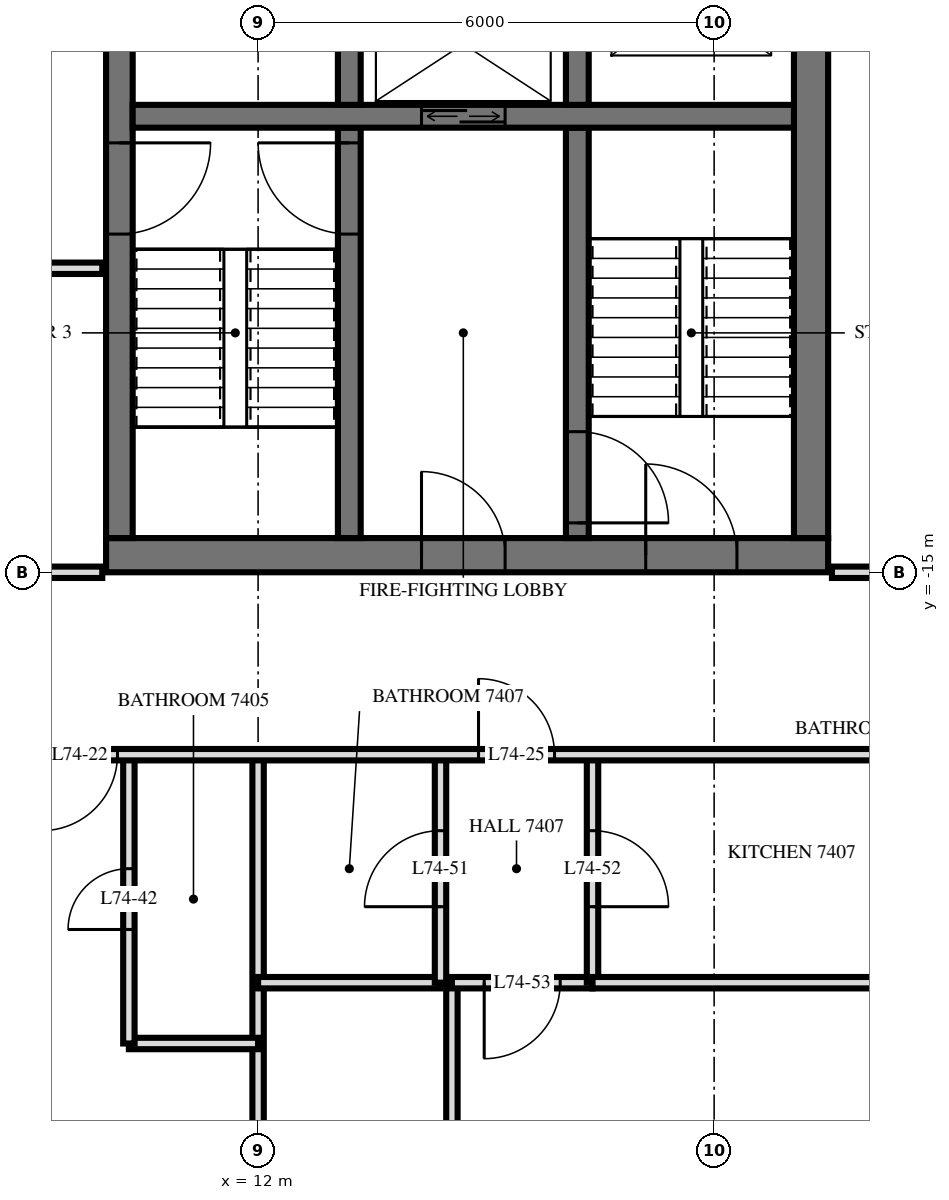
"""IFC4 building model, lengths in metres.
Left out: names, types, materials, properties, quantities, classifications, styles, units other than length and angle.
Written with IfcOpenShell. Run it as: python <this file> out.ifc"""

import sys

from ifc_helpers import new_model, si_unit, direction, frame, frame_2d, origin, place, context, subcontext, project, spatial, rectangle, extrude, element, fill, save


model = new_model("IFC4")
c1 = context("Model", 3, precision=1e-05, world=origin(), true_north=direction((0.0, 1.0)))
c2 = subcontext(c1, "Body", "Model", "MODEL_VIEW")
j1 = project(units=[si_unit("LENGTHUNIT", "METRE"), si_unit("PLANEANGLEUNIT", "RADIAN")], contexts=[c1])
p1 = place(None, origin())
s1 = spatial("IfcSite", under=j1, at=p1, CompositionType="ELEMENT")
p2 = place(p1, origin())
s2 = spatial("IfcBuilding", under=s1, at=p2, CompositionType="ELEMENT")
p3 = place(p2, frame((0.0, 0.0, 280.6)))
s3 = spatial("IfcBuildingStorey", under=s2, at=p3, CompositionType="ELEMENT", Elevation=280.6)
p4 = place(p3, frame((10.0, -14.775, 0.0), z_axis=(0.0, 0.0, 1.0), x_axis=(1.0, 0.0, 0.0)))
e1 = element("IfcWall", 1, at=p4, inside=s3, PredefinedType="SHEAR", context=c2, shape_type="SweptSolid", body=[
    extrude(rectangle(XDim=9.5, YDim=0.45, at=frame_2d((4.75, 0.0))), origin(), (0.0, 0.0, 1.0), 3.5),
])
p5 = place(p4, frame((7.1, 0.0, 0.0)))
e2 = element("IfcOpeningElement", 2, at=p5, cuts=e1, PredefinedType="OPENING", context=c2, shape_type="SweptSolid", body=[
    extrude(rectangle(XDim=1.2, YDim=2.1, at=frame_2d((0.6, 1.05))), frame((0.0, 0.235, 0.0), z_axis=(0.0, -1.0, 0.0), x_axis=(1.0, 0.0, 0.0)), (0.0, 0.0, 1.0), 0.47),
])
p6 = place(p4, frame((4.15, 0.0, 0.0)))
e3 = element("IfcOpeningElement", 3, at=p6, cuts=e1, PredefinedType="OPENING", context=c2, shape_type="SweptSolid", body=[
    extrude(rectangle(XDim=1.1, YDim=2.1, at=frame_2d((0.55, 1.05))), frame((0.0, 0.235, 0.0), z_axis=(0.0, -1.0, 0.0), x_axis=(1.0, 0.0, 0.0)), (0.0, 0.0, 1.0), 0.47),
])
p7 = place(p3, frame((10.175, -14.55, 0.0), z_axis=(0.0, 0.0, 1.0), x_axis=(0.0, 1.0, 0.0)))
e4 = element("IfcWall", 4, at=p7, inside=s3, PredefinedType="SHEAR", context=c2, shape_type="SweptSolid", body=[
    extrude(rectangle(XDim=14.1, YDim=0.35, at=frame_2d((7.05, 0.0))), origin(), (0.0, 0.0, 1.0), 3.5),
])
p8 = place(p7, frame((8.4, 0.0, 0.0)))
e5 = element("IfcOpeningElement", 5, at=p8, cuts=e4, PredefinedType="OPENING", context=c2, shape_type="SweptSolid", body=[
    extrude(rectangle(XDim=1.4, YDim=2.4, at=frame_2d((0.7, 1.2))), frame((0.0, 0.185, 0.0), z_axis=(0.0, -1.0, 0.0), x_axis=(1.0, 0.0, 0.0)), (0.0, 0.0, 1.0), 0.37),
])
p9 = place(p7, frame((10.0, 0.0, 0.0)))
e6 = element("IfcOpeningElement", 6, at=p9, cuts=e4, PredefinedType="OPENING", context=c2, shape_type="SweptSolid", body=[
    extrude(rectangle(XDim=1.4, YDim=2.4, at=frame_2d((0.7, 1.2))), frame((0.0, 0.185, 0.0), z_axis=(0.0, -1.0, 0.0), x_axis=(1.0, 0.0, 0.0)), (0.0, 0.0, 1.0), 0.37),
])
p10 = place(p7, frame((4.0, 0.0, 0.0)))
e7 = element("IfcOpeningElement", 7, at=p10, cuts=e4, PredefinedType="OPENING", context=c2, shape_type="SweptSolid", body=[
    extrude(rectangle(XDim=1.2, YDim=2.1, at=frame_2d((0.6, 1.05))), frame((0.0, 0.185, 0.0), z_axis=(0.0, -1.0, 0.0), x_axis=(1.0, 0.0, 0.0)), (0.0, 0.0, 1.0), 0.37),
])
p11 = place(p3, frame((19.275, -14.55, 0.0), z_axis=(0.0, 0.0, 1.0), x_axis=(0.0, 1.0, 0.0)))
e8 = element("IfcWall", 8, at=p11, inside=s3, PredefinedType="SHEAR", context=c2, shape_type="SweptSolid", body=[
    extrude(rectangle(XDim=14.1, YDim=0.45, at=frame_2d((7.05, 0.0))), origin(), (0.0, 0.0, 1.0), 3.5),
])
p12 = place(p3, frame((10.35, -9.0, 0.0), z_axis=(0.0, 0.0, 1.0), x_axis=(1.0, 0.0, 0.0)))
e9 = element("IfcWall", 9, at=p12, inside=s3, PredefinedType="SHEAR", context=c2, shape_type="SweptSolid", body=[
    extrude(rectangle(XDim=8.7, YDim=0.3, at=frame_2d((4.35, 0.0))), origin(), (0.0, 0.0, 1.0), 3.5),
])
p13 = place(p12, frame((3.8, 0.0, 0.0)))
e10 = element("IfcOpeningElement", 10, at=p13, cuts=e9, PredefinedType="OPENING", context=c2, shape_type="SweptSolid", body=[
    extrude(rectangle(XDim=1.1, YDim=2.1, at=frame_2d((0.55, 1.05))), frame((0.0, 0.16, 0.0), z_axis=(0.0, -1.0, 0.0), x_axis=(1.0, 0.0, 0.0)), (0.0, 0.0, 1.0), 0.32),
])
p14 = place(p3, frame((13.2, -8.85, 0.0), z_axis=(0.0, 0.0, 1.0), x_axis=(0.0, 1.0, 0.0)))
e11 = element("IfcWall", 11, at=p14, inside=s3, PredefinedType="SHEAR", context=c2, shape_type="SweptSolid", body=[
    extrude(rectangle(XDim=2.3, YDim=0.3, at=frame_2d((1.15, 0.0))), origin(), (0.0, 0.0, 1.0), 3.5),
])
p15 = place(p3, frame((13.2, -14.55, 0.0), z_axis=(0.0, 0.0, 1.0), x_axis=(0.0, 1.0, 0.0)))
e12 = element("IfcWall", 12, at=p15, inside=s3, PredefinedType="SHEAR", context=c2, shape_type="SweptSolid", body=[
    extrude(rectangle(XDim=5.4, YDim=0.3, at=frame_2d((2.7, 0.0))), origin(), (0.0, 0.0, 1.0), 3.5),
])
p16 = place(p15, frame((4.0, 0.0, 0.0)))
e13 = element("IfcOpeningElement", 13, at=p16, cuts=e12, PredefinedType="OPENING", context=c2, shape_type="SweptSolid", body=[
    extrude(rectangle(XDim=1.2, YDim=2.1, at=frame_2d((0.6, 1.05))), frame((0.0, 0.16, 0.0), z_axis=(0.0, -1.0, 0.0), x_axis=(1.0, 0.0, 0.0)), (0.0, 0.0, 1.0), 0.32),
])
p17 = place(p3, frame((16.2, -8.85, 0.0), z_axis=(0.0, 0.0, 1.0), x_axis=(0.0, 1.0, 0.0)))
e14 = element("IfcWall", 14, at=p17, inside=s3, PredefinedType="SHEAR", context=c2, shape_type="SweptSolid", body=[
    extrude(rectangle(XDim=2.3, YDim=0.3, at=frame_2d((1.15, 0.0))), origin(), (0.0, 0.0, 1.0), 3.5),
])
p18 = place(p3, frame((16.2, -14.55, 0.0), z_axis=(0.0, 0.0, 1.0), x_axis=(0.0, 1.0, 0.0)))
e15 = element("IfcWall", 15, at=p18, inside=s3, PredefinedType="SHEAR", context=c2, shape_type="SweptSolid", body=[
    extrude(rectangle(XDim=5.4, YDim=0.3, at=frame_2d((2.7, 0.0))), origin(), (0.0, 0.0, 1.0), 3.5),
])
p19 = place(p18, frame((0.2, 0.0, 0.0)))
e16 = element("IfcOpeningElement", 16, at=p19, cuts=e15, PredefinedType="OPENING", context=c2, shape_type="SweptSolid", body=[
    extrude(rectangle(XDim=1.2, YDim=2.1, at=frame_2d((0.6, 1.05))), frame((0.0, 0.16, 0.0), z_axis=(0.0, -1.0, 0.0), x_axis=(1.0, 0.0, 0.0)), (0.0, 0.0, 1.0), 0.32),
])
p20 = place(p3, frame((16.4, -20.4, 0.0), z_axis=(0.0, 0.0, 1.0), x_axis=(0.0, 1.0, 0.0)))
e17 = element("IfcWall", 17, at=p20, inside=s3, PredefinedType="PARTITIONING", context=c2, shape_type="SweptSolid", body=[
    extrude(rectangle(XDim=3.0, YDim=0.15, at=frame_2d((1.5, 0.0))), origin(), (0.0, 0.0, 1.0), 3.22),
])
p21 = place(p20, frame((1.0, 0.0, 0.0)))
e18 = element("IfcOpeningElement", 18, at=p21, cuts=e17, PredefinedType="OPENING", context=c2, shape_type="SweptSolid", body=[
    extrude(rectangle(XDim=1.0, YDim=2.1, at=frame_2d((0.5, 1.05))), frame((0.0, 0.085, 0.0), z_axis=(0.0, -1.0, 0.0), x_axis=(1.0, 0.0, 0.0)), (0.0, 0.0, 1.0), 0.17),
])
p22 = place(p3, frame((14.55, -33.62, 0.0), z_axis=(0.0, 0.0, 1.0), x_axis=(0.0, 1.0, 0.0)))
e19 = element("IfcWall", 19, at=p22, inside=s3, PredefinedType="PARTITIONING", context=c2, shape_type="SweptSolid", body=[
    extrude(rectangle(XDim=13.22, YDim=0.15, at=frame_2d((6.61, 0.0))), origin(), (0.0, 0.0, 1.0), 3.22),
])
p23 = place(p22, frame((6.07, 0.0, 0.0)))
e20 = element("IfcOpeningElement", 20, at=p23, cuts=e19, PredefinedType="OPENING", context=c2, shape_type="SweptSolid", body=[
    extrude(rectangle(XDim=0.9, YDim=2.1, at=frame_2d((0.45, 1.05))), frame((0.0, 0.085, 0.0), z_axis=(0.0, -1.0, 0.0), x_axis=(1.0, 0.0, 0.0)), (0.0, 0.0, 1.0), 0.17),
])
p24 = place(p3, frame((14.4, -20.4, 0.0), z_axis=(0.0, 0.0, 1.0), x_axis=(0.0, 1.0, 0.0)))
e21 = element("IfcWall", 21, at=p24, inside=s3, PredefinedType="PARTITIONING", context=c2, shape_type="SweptSolid", body=[
    extrude(rectangle(XDim=3.0, YDim=0.15, at=frame_2d((1.5, 0.0))), origin(), (0.0, 0.0, 1.0), 3.22),
])
p25 = place(p24, frame((1.0, 0.0, 0.0)))
e22 = element("IfcOpeningElement", 22, at=p25, cuts=e21, PredefinedType="OPENING", context=c2, shape_type="SweptSolid", body=[
    extrude(rectangle(XDim=1.0, YDim=2.1, at=frame_2d((0.5, 1.05))), frame((0.0, 0.085, 0.0), z_axis=(0.0, -1.0, 0.0), x_axis=(1.0, 0.0, 0.0)), (0.0, 0.0, 1.0), 0.17),
])
p26 = place(p3, frame((12.0, -33.62, 0.0), z_axis=(0.0, 0.0, 1.0), x_axis=(0.0, 1.0, 0.0)))
e23 = element("IfcWall", 23, at=p26, inside=s3, PredefinedType="PARTITIONING", context=c2, shape_type="SweptSolid", body=[
    extrude(rectangle(XDim=16.22, YDim=0.15, at=frame_2d((8.11, 0.0))), origin(), (0.0, 0.0, 1.0), 3.22),
])
p27 = place(p3, frame((10.3, -21.2, 0.0), z_axis=(0.0, 0.0, 1.0), x_axis=(0.0, 1.0, 0.0)))
e24 = element("IfcWall", 24, at=p27, inside=s3, PredefinedType="PARTITIONING", context=c2, shape_type="SweptSolid", body=[
    extrude(rectangle(XDim=3.8, YDim=0.15, at=frame_2d((1.9, 0.0))), origin(), (0.0, 0.0, 1.0), 3.22),
])
p28 = place(p27, frame((1.5, 0.0, 0.0)))
e25 = element("IfcOpeningElement", 25, at=p28, cuts=e24, PredefinedType="OPENING", context=c2, shape_type="SweptSolid", body=[
    extrude(rectangle(XDim=0.8, YDim=2.1, at=frame_2d((0.4, 1.05))), frame((0.0, 0.085, 0.0), z_axis=(0.0, -1.0, 0.0), x_axis=(1.0, 0.0, 0.0)), (0.0, 0.0, 1.0), 0.17),
])
p29 = place(p3, frame((10.3, -21.2, 0.0), z_axis=(0.0, 0.0, 1.0), x_axis=(1.0, 0.0, 0.0)))
e26 = element("IfcWall", 26, at=p29, inside=s3, PredefinedType="PARTITIONING", context=c2, shape_type="SweptSolid", body=[
    extrude(rectangle(XDim=1.7, YDim=0.15, at=frame_2d((0.85, 0.0))), origin(), (0.0, 0.0, 1.0), 3.22),
])
p30 = place(p3, frame((14.55, -20.4, 0.0), z_axis=(0.0, 0.0, 1.0), x_axis=(1.0, 0.0, 0.0)))
e27 = element("IfcWall", 27, at=p30, inside=s3, PredefinedType="PARTITIONING", context=c2, shape_type="SweptSolid", body=[
    extrude(rectangle(XDim=1.85, YDim=0.15, at=frame_2d((0.925, 0.0))), origin(), (0.0, 0.0, 1.0), 3.22),
])
p31 = place(p30, frame((0.425, 0.0, 0.0)))
e28 = element("IfcOpeningElement", 28, at=p31, cuts=e27, PredefinedType="OPENING", context=c2, shape_type="SweptSolid", body=[
    extrude(rectangle(XDim=1.0, YDim=2.1, at=frame_2d((0.5, 1.05))), frame((0.0, 0.085, 0.0), z_axis=(0.0, -1.0, 0.0), x_axis=(1.0, 0.0, 0.0)), (0.0, 0.0, 1.0), 0.17),
])
p32 = place(p3, frame((12.0, -20.4, 0.0), z_axis=(0.0, 0.0, 1.0), x_axis=(1.0, 0.0, 0.0)))
e29 = element("IfcWall", 29, at=p32, inside=s3, PredefinedType="PARTITIONING", context=c2, shape_type="SweptSolid", body=[
    extrude(rectangle(XDim=2.4, YDim=0.15, at=frame_2d((1.2, 0.0))), origin(), (0.0, 0.0, 1.0), 3.22),
])
p33 = place(p3, frame((16.4, -20.4, 0.0), z_axis=(0.0, 0.0, 1.0), x_axis=(1.0, 0.0, 0.0)))
e30 = element("IfcWall", 30, at=p33, inside=s3, PredefinedType="PARTITIONING", context=c2, shape_type="SweptSolid", body=[
    extrude(rectangle(XDim=4.15, YDim=0.15, at=frame_2d((2.075, 0.0))), origin(), (0.0, 0.0, 1.0), 3.22),
])
p34 = place(p3, frame((-22.92, -17.4, 0.0), z_axis=(0.0, 0.0, 1.0), x_axis=(1.0, 0.0, 0.0)))
e31 = element("IfcWall", 31, at=p34, inside=s3, PredefinedType="PARTITIONING", context=c2, shape_type="SweptSolid", body=[
    extrude(rectangle(XDim=45.84, YDim=0.15, at=frame_2d((22.92, 0.0))), origin(), (0.0, 0.0, 1.0), 3.22),
])
p35 = place(p34, frame((21.67, 0.0, 0.0)))
e32 = element("IfcOpeningElement", 32, at=p35, cuts=e31, PredefinedType="OPENING", context=c2, shape_type="SweptSolid", body=[
    extrude(rectangle(XDim=1.0, YDim=2.1, at=frame_2d((0.5, 1.05))), frame((0.0, 0.085, 0.0), z_axis=(0.0, -1.0, 0.0), x_axis=(1.0, 0.0, 0.0)), (0.0, 0.0, 1.0), 0.17),
])
p36 = place(p34, frame((24.77, 0.0, 0.0)))
e33 = element("IfcOpeningElement", 33, at=p36, cuts=e31, PredefinedType="OPENING", context=c2, shape_type="SweptSolid", body=[
    extrude(rectangle(XDim=1.0, YDim=2.1, at=frame_2d((0.5, 1.05))), frame((0.0, 0.085, 0.0), z_axis=(0.0, -1.0, 0.0), x_axis=(1.0, 0.0, 0.0)), (0.0, 0.0, 1.0), 0.17),
])
p37 = place(p34, frame((26.07, 0.0, 0.0)))
e34 = element("IfcOpeningElement", 34, at=p37, cuts=e31, PredefinedType="OPENING", context=c2, shape_type="SweptSolid", body=[
    extrude(rectangle(XDim=1.0, YDim=2.1, at=frame_2d((0.5, 1.05))), frame((0.0, 0.085, 0.0), z_axis=(0.0, -1.0, 0.0), x_axis=(1.0, 0.0, 0.0)), (0.0, 0.0, 1.0), 0.17),
])
p38 = place(p34, frame((30.77, 0.0, 0.0)))
e35 = element("IfcOpeningElement", 35, at=p38, cuts=e31, PredefinedType="OPENING", context=c2, shape_type="SweptSolid", body=[
    extrude(rectangle(XDim=1.0, YDim=2.1, at=frame_2d((0.5, 1.05))), frame((0.0, 0.085, 0.0), z_axis=(0.0, -1.0, 0.0), x_axis=(1.0, 0.0, 0.0)), (0.0, 0.0, 1.0), 0.17),
])
p39 = place(p34, frame((32.07, 0.0, 0.0)))
e36 = element("IfcOpeningElement", 36, at=p39, cuts=e31, PredefinedType="OPENING", context=c2, shape_type="SweptSolid", body=[
    extrude(rectangle(XDim=1.0, YDim=2.1, at=frame_2d((0.5, 1.05))), frame((0.0, 0.085, 0.0), z_axis=(0.0, -1.0, 0.0), x_axis=(1.0, 0.0, 0.0)), (0.0, 0.0, 1.0), 0.17),
])
p40 = place(p34, frame((9.42, 0.0, 0.0)))
e37 = element("IfcOpeningElement", 37, at=p40, cuts=e31, PredefinedType="OPENING", context=c2, shape_type="SweptSolid", body=[
    extrude(rectangle(XDim=1.0, YDim=2.1, at=frame_2d((0.5, 1.05))), frame((0.0, 0.085, 0.0), z_axis=(0.0, -1.0, 0.0), x_axis=(1.0, 0.0, 0.0)), (0.0, 0.0, 1.0), 0.17),
])
p41 = place(p34, frame((2.67, 0.0, 0.0)))
e38 = element("IfcOpeningElement", 38, at=p41, cuts=e31, PredefinedType="OPENING", context=c2, shape_type="SweptSolid", body=[
    extrude(rectangle(XDim=1.0, YDim=2.1, at=frame_2d((0.5, 1.05))), frame((0.0, 0.085, 0.0), z_axis=(0.0, -1.0, 0.0), x_axis=(1.0, 0.0, 0.0)), (0.0, 0.0, 1.0), 0.17),
])
p42 = place(p34, frame((37.82, 0.0, 0.0)))
e39 = element("IfcOpeningElement", 39, at=p42, cuts=e31, PredefinedType="OPENING", context=c2, shape_type="SweptSolid", body=[
    extrude(rectangle(XDim=1.0, YDim=2.1, at=frame_2d((0.5, 1.05))), frame((0.0, 0.085, 0.0), z_axis=(0.0, -1.0, 0.0), x_axis=(1.0, 0.0, 0.0)), (0.0, 0.0, 1.0), 0.17),
])
p43 = place(p3, frame((-9.95, -15.0, 0.0), z_axis=(0.0, 0.0, 1.0), x_axis=(1.0, 0.0, 0.0)))
e40 = element("IfcWall", 40, at=p43, inside=s3, PredefinedType="PARTITIONING", context=c2, shape_type="SweptSolid", body=[
    extrude(rectangle(XDim=19.9, YDim=0.15, at=frame_2d((9.95, 0.0))), origin(), (0.0, 0.0, 1.0), 2.584),
])
p44 = place(p43, frame((9.45, 0.0, 0.0)))
e41 = element("IfcOpeningElement", 41, at=p44, cuts=e40, PredefinedType="OPENING", context=c2, shape_type="SweptSolid", body=[
    extrude(rectangle(XDim=1.0, YDim=2.1, at=frame_2d((0.5, 1.05))), frame((0.0, 0.085, 0.0), z_axis=(0.0, -1.0, 0.0), x_axis=(1.0, 0.0, 0.0)), (0.0, 0.0, 1.0), 0.17),
])
p45 = place(p3, frame((19.55, -15.0, 0.0), z_axis=(0.0, 0.0, 1.0), x_axis=(1.0, 0.0, 0.0)))
e42 = element("IfcWall", 42, at=p45, inside=s3, PredefinedType="PARTITIONING", context=c2, shape_type="SweptSolid", body=[
    extrude(rectangle(XDim=3.37, YDim=0.15, at=frame_2d((1.685, 0.0))), origin(), (0.0, 0.0, 1.0), 3.22),
])
p46 = place(p45, frame((0.9, 0.0, 0.0)))
e43 = element("IfcOpeningElement", 43, at=p46, cuts=e42, PredefinedType="OPENING", context=c2, shape_type="SweptSolid", body=[
    extrude(rectangle(XDim=1.0, YDim=2.1, at=frame_2d((0.5, 1.05))), frame((0.0, 0.085, 0.0), z_axis=(0.0, -1.0, 0.0), x_axis=(1.0, 0.0, 0.0)), (0.0, 0.0, 1.0), 0.17),
])
p47 = place(p3, frame((-9.95, -11.0, 0.0), z_axis=(0.0, 0.0, 1.0), x_axis=(1.0, 0.0, 0.0)))
e44 = element("IfcWall", 44, at=p47, inside=s3, PredefinedType="PARTITIONING", context=c2, shape_type="SweptSolid", body=[
    extrude(rectangle(XDim=19.9, YDim=0.15, at=frame_2d((9.95, 0.0))), origin(), (0.0, 0.0, 1.0), 3.22),
])
p48 = place(p47, frame((9.45, 0.0, 0.0)))
e45 = element("IfcOpeningElement", 45, at=p48, cuts=e44, PredefinedType="OPENING", context=c2, shape_type="SweptSolid", body=[
    extrude(rectangle(XDim=1.0, YDim=2.1, at=frame_2d((0.5, 1.05))), frame((0.0, 0.085, 0.0), z_axis=(0.0, -1.0, 0.0), x_axis=(1.0, 0.0, 0.0)), (0.0, 0.0, 1.0), 0.17),
])
p49 = place(p47, frame((15.45, 0.0, 0.0)))
e46 = element("IfcOpeningElement", 46, at=p49, cuts=e44, PredefinedType="OPENING", context=c2, shape_type="SweptSolid", body=[
    extrude(rectangle(XDim=1.0, YDim=2.1, at=frame_2d((0.5, 1.05))), frame((0.0, 0.085, 0.0), z_axis=(0.0, -1.0, 0.0), x_axis=(1.0, 0.0, 0.0)), (0.0, 0.0, 1.0), 0.17),
])
p50 = place(p13, origin())
e47 = element("IfcDoor", 47, at=p50, inside=s3, OperationType="DOUBLE_DOOR_SLIDING", PredefinedType="USERDEFINED", context=c2, shape_type="SweptSolid", body=[
    extrude(rectangle(XDim=1.1, YDim=2.1, at=frame_2d((0.55, 1.05))), frame((0.0, 0.025, 0.0), z_axis=(0.0, -1.0, 0.0), x_axis=(1.0, 0.0, 0.0)), (0.0, 0.0, 1.0), 0.05),
])
fill(e10, e47)
p51 = place(p10, frame((0.6, 0.0, 0.0), z_axis=(0.0, 0.0, 1.0), x_axis=(-1.0, 0.0, 0.0)))
e48 = element("IfcDoor", 48, at=p51, inside=s3, OperationType="SINGLE_SWING_RIGHT", PredefinedType="DOOR", context=c2, shape_type="SweptSolid", body=[
    extrude(rectangle(XDim=1.2, YDim=2.1, at=frame_2d((0.0, 1.05))), frame((0.0, -0.025, 0.0), z_axis=(0.0, 1.0, 0.0), x_axis=(-1.0, 0.0, 0.0)), (0.0, 0.0, 1.0), 0.05),
])
fill(e7, e48)
p52 = place(p5, origin())
e49 = element("IfcDoor", 49, at=p52, inside=s3, OperationType="SINGLE_SWING_RIGHT", PredefinedType="DOOR", context=c2, shape_type="SweptSolid", body=[
    extrude(rectangle(XDim=1.2, YDim=2.1, at=frame_2d((0.6, 1.05))), frame((0.0, 0.025, 0.0), z_axis=(0.0, -1.0, 0.0), x_axis=(1.0, 0.0, 0.0)), (0.0, 0.0, 1.0), 0.05),
])
fill(e2, e49)
p53 = place(p6, origin())
e50 = element("IfcDoor", 50, at=p53, inside=s3, OperationType="SINGLE_SWING_RIGHT", PredefinedType="DOOR", context=c2, shape_type="SweptSolid", body=[
    extrude(rectangle(XDim=1.1, YDim=2.1, at=frame_2d((0.55, 1.05))), frame((0.0, 0.025, 0.0), z_axis=(0.0, -1.0, 0.0), x_axis=(1.0, 0.0, 0.0)), (0.0, 0.0, 1.0), 0.05),
])
fill(e3, e50)
p54 = place(p16, origin())
e51 = element("IfcDoor", 51, at=p54, inside=s3, OperationType="SINGLE_SWING_LEFT", PredefinedType="DOOR", context=c2, shape_type="SweptSolid", body=[
    extrude(rectangle(XDim=1.2, YDim=2.1, at=frame_2d((0.6, 1.05))), frame((0.0, 0.025, 0.0), z_axis=(0.0, -1.0, 0.0), x_axis=(1.0, 0.0, 0.0)), (0.0, 0.0, 1.0), 0.05),
])
fill(e13, e51)
p55 = place(p19, frame((0.6, 0.0, 0.0), z_axis=(0.0, 0.0, 1.0), x_axis=(-1.0, 0.0, 0.0)))
e52 = element("IfcDoor", 52, at=p55, inside=s3, OperationType="SINGLE_SWING_LEFT", PredefinedType="DOOR", context=c2, shape_type="SweptSolid", body=[
    extrude(rectangle(XDim=1.2, YDim=2.1, at=frame_2d((0.0, 1.05))), frame((0.0, -0.025, 0.0), z_axis=(0.0, 1.0, 0.0), x_axis=(-1.0, 0.0, 0.0)), (0.0, 0.0, 1.0), 0.05),
])
fill(e16, e52)
p56 = place(p39, frame((0.5, 0.0, 0.0), z_axis=(0.0, 0.0, 1.0), x_axis=(-1.0, 0.0, 0.0)))
e53 = element("IfcDoor", 53, at=p56, inside=s3, OperationType="SINGLE_SWING_LEFT", PredefinedType="DOOR", context=c2, shape_type="SweptSolid", body=[
    extrude(rectangle(XDim=1.0, YDim=2.1, at=frame_2d((0.0, 1.05))), frame((0.0, -0.025, 0.0), z_axis=(0.0, 1.0, 0.0), x_axis=(-1.0, 0.0, 0.0)), (0.0, 0.0, 1.0), 0.05),
])
fill(e36, e53)
p57 = place(p42, origin())
e54 = element("IfcDoor", 54, at=p57, inside=s3, OperationType="SINGLE_SWING_RIGHT", PredefinedType="DOOR", context=c2, shape_type="SweptSolid", body=[
    extrude(rectangle(XDim=1.0, YDim=2.1, at=frame_2d((0.5, 1.05))), frame((0.0, 0.025, 0.0), z_axis=(0.0, -1.0, 0.0), x_axis=(1.0, 0.0, 0.0)), (0.0, 0.0, 1.0), 0.05),
])
fill(e39, e54)
p58 = place(p28, origin())
e55 = element("IfcDoor", 55, at=p58, inside=s3, OperationType="SINGLE_SWING_RIGHT", PredefinedType="DOOR", context=c2, shape_type="SweptSolid", body=[
    extrude(rectangle(XDim=0.8, YDim=2.1, at=frame_2d((0.4, 1.05))), frame((0.0, 0.025, 0.0), z_axis=(0.0, -1.0, 0.0), x_axis=(1.0, 0.0, 0.0)), (0.0, 0.0, 1.0), 0.05),
])
fill(e25, e55)
p59 = place(p25, origin())
e56 = element("IfcDoor", 56, at=p59, inside=s3, OperationType="SINGLE_SWING_RIGHT", PredefinedType="DOOR", context=c2, shape_type="SweptSolid", body=[
    extrude(rectangle(XDim=1.0, YDim=2.1, at=frame_2d((0.5, 1.05))), frame((0.0, 0.025, 0.0), z_axis=(0.0, -1.0, 0.0), x_axis=(1.0, 0.0, 0.0)), (0.0, 0.0, 1.0), 0.05),
])
fill(e22, e56)
p60 = place(p21, frame((0.5, 0.0, 0.0), z_axis=(0.0, 0.0, 1.0), x_axis=(-1.0, 0.0, 0.0)))
e57 = element("IfcDoor", 57, at=p60, inside=s3, OperationType="SINGLE_SWING_LEFT", PredefinedType="DOOR", context=c2, shape_type="SweptSolid", body=[
    extrude(rectangle(XDim=1.0, YDim=2.1, at=frame_2d((0.0, 1.05))), frame((0.0, -0.025, 0.0), z_axis=(0.0, 1.0, 0.0), x_axis=(-1.0, 0.0, 0.0)), (0.0, 0.0, 1.0), 0.05),
])
fill(e18, e57)
p61 = place(p31, frame((0.5, 0.0, 0.0), z_axis=(0.0, 0.0, 1.0), x_axis=(-1.0, 0.0, 0.0)))
e58 = element("IfcDoor", 58, at=p61, inside=s3, OperationType="SINGLE_SWING_LEFT", PredefinedType="DOOR", context=c2, shape_type="SweptSolid", body=[
    extrude(rectangle(XDim=1.0, YDim=2.1, at=frame_2d((0.0, 1.05))), frame((0.0, -0.025, 0.0), z_axis=(0.0, 1.0, 0.0), x_axis=(-1.0, 0.0, 0.0)), (0.0, 0.0, 1.0), 0.05),
])
fill(e28, e58)
save(model, sys.argv[1])
